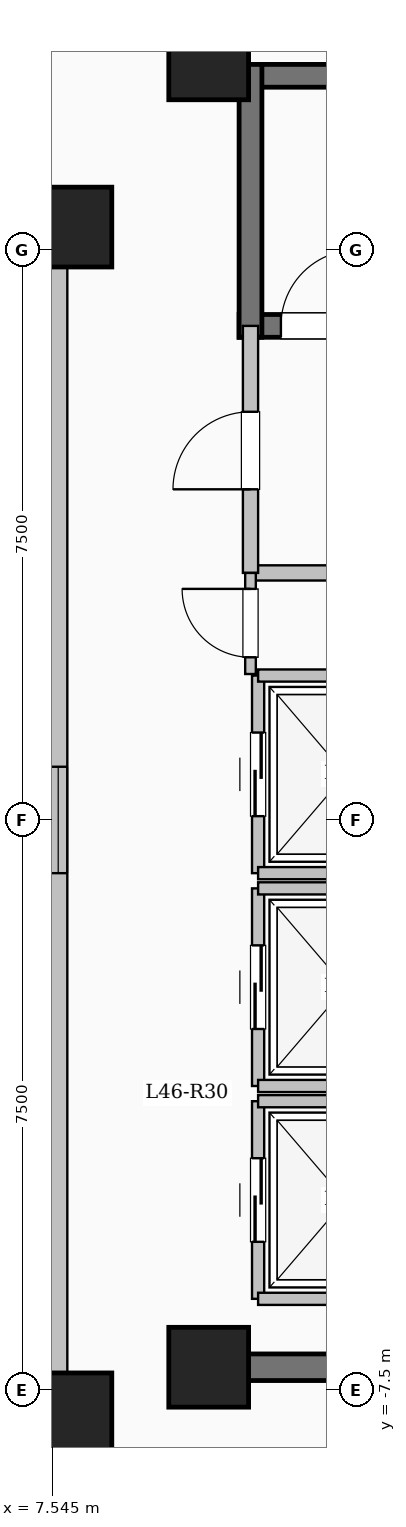
"""IFC4 building model, lengths in metres.
Left out: names, types, materials, properties, quantities, classifications, styles, units other than length and angle.
Written with IfcOpenShell. Run it as: python <this file> out.ifc"""

import sys

from ifc_helpers import new_model, si_unit, direction, frame, frame_2d, origin, origin_2d, place, context, subcontext, project, spatial, rectangle, extrude, element, fill, save


model = new_model("IFC4")
c1 = context("Model", 3, precision=1e-05, world=origin(), true_north=direction((0.0, 1.0)))
c2 = subcontext(c1, "Body", "Model", "MODEL_VIEW")
j1 = project(units=[si_unit("LENGTHUNIT", "METRE"), si_unit("PLANEANGLEUNIT", "RADIAN")], contexts=[c1])
p1 = place(None, origin())
s1 = spatial("IfcSite", under=j1, at=p1, CompositionType="ELEMENT")
p2 = place(p1, origin())
s2 = spatial("IfcBuilding", under=s1, at=p2, CompositionType="ELEMENT")
p3 = place(p2, frame((0.0, 0.0, 169.45)))
s3 = spatial("IfcBuildingStorey", under=s2, at=p3, CompositionType="ELEMENT", Elevation=169.45)
for number, where, z_axis, x_axis in (
    (1, (7.8, -7.8, 0.0), (0.0, 0.0, 1.0), (1.0, 0.0, 0.0)),
    (2, (7.8, 7.8, 0.0), (0.0, 0.0, 1.0), (1.0, 0.0, 0.0)),
    (3, (9.6, -7.2, 0.0), (0.0, 0.0, 1.0), (1.0, 0.0, 0.0)),
    (4, (9.6, 10.0, 0.0), (0.0, 0.0, 1.0), (1.0, 0.0, 0.0)),
):
    element("IfcColumn", number, at=place(p3, frame(where, z_axis=z_axis, x_axis=x_axis)), inside=s3, PredefinedType="COLUMN", context=c2, shape_type="SweptSolid", body=[
        extrude(rectangle(XDim=1.05, YDim=1.05, at=origin_2d()), origin(), (0.0, 0.0, 1.0), 3.35),
    ])
p4 = place(p3, frame((-7.62, -7.62, 0.0), z_axis=(0.0, 0.0, 1.0), x_axis=(1.0, 0.0, 0.0)))
e5 = element("IfcWall", 5, at=p4, inside=s3, PredefinedType="SOLIDWALL", context=c2, shape_type="SweptSolid", body=[
    extrude(rectangle(XDim=15.24, YDim=0.24, at=frame_2d((7.62, 0.0))), origin(), (0.0, 0.0, 1.0), 3.05),
])
p5 = place(p4, frame((6.92, 0.0, 0.95)))
e6 = element("IfcOpeningElement", 6, at=p5, cuts=e5, PredefinedType="OPENING", context=c2, shape_type="SweptSolid", body=[
    extrude(rectangle(XDim=1.4, YDim=1.5, at=frame_2d((0.7, 0.75))), frame((0.0, 0.13, 0.0), z_axis=(0.0, -1.0, 0.0), x_axis=(1.0, 0.0, 0.0)), (0.0, 0.0, 1.0), 0.26),
])
p6 = place(p3, frame((7.62, -7.62, 0.0), z_axis=(0.0, 0.0, 1.0), x_axis=(0.0, 1.0, 0.0)))
e7 = element("IfcWall", 7, at=p6, inside=s3, PredefinedType="SOLIDWALL", context=c2, shape_type="SweptSolid", body=[
    extrude(rectangle(XDim=15.24, YDim=0.24, at=frame_2d((7.62, 0.0))), origin(), (0.0, 0.0, 1.0), 3.05),
])
p7 = place(p6, frame((6.92, 0.0, 0.95)))
e8 = element("IfcOpeningElement", 8, at=p7, cuts=e7, PredefinedType="OPENING", context=c2, shape_type="SweptSolid", body=[
    extrude(rectangle(XDim=1.4, YDim=1.5, at=frame_2d((0.7, 0.75))), frame((0.0, 0.13, 0.0), z_axis=(0.0, -1.0, 0.0), x_axis=(1.0, 0.0, 0.0)), (0.0, 0.0, 1.0), 0.26),
])
p8 = place(p3, frame((7.62, 7.62, 0.0), z_axis=(0.0, 0.0, 1.0), x_axis=(-1.0, 0.0, 0.0)))
e9 = element("IfcWall", 9, at=p8, inside=s3, PredefinedType="SOLIDWALL", context=c2, shape_type="SweptSolid", body=[
    extrude(rectangle(XDim=15.24, YDim=0.24, at=frame_2d((7.62, 0.0))), origin(), (0.0, 0.0, 1.0), 3.05),
])
p9 = place(p8, frame((6.92, 0.0, 0.95)))
e10 = element("IfcOpeningElement", 10, at=p9, cuts=e9, PredefinedType="OPENING", context=c2, shape_type="SweptSolid", body=[
    extrude(rectangle(XDim=1.4, YDim=1.5, at=frame_2d((0.7, 0.75))), frame((0.0, 0.13, 0.0), z_axis=(0.0, -1.0, 0.0), x_axis=(1.0, 0.0, 0.0)), (0.0, 0.0, 1.0), 0.26),
])
p10 = place(p3, frame((10.0, 9.79, 0.0), z_axis=(0.0, 0.0, 1.0), x_axis=(1.0, 0.0, 0.0)))
e11 = element("IfcWall", 11, at=p10, inside=s3, PredefinedType="SHEAR", context=c2, shape_type="SweptSolid", body=[
    extrude(rectangle(XDim=8.0, YDim=0.3, at=frame_2d((4.0, 0.0))), origin(), (0.0, 0.0, 1.0), 3.35),
])
p11 = place(p3, frame((10.0, 6.5, 0.0), z_axis=(0.0, 0.0, 1.0), x_axis=(1.0, 0.0, 0.0)))
e12 = element("IfcWall", 12, at=p11, inside=s3, PredefinedType="SHEAR", context=c2, shape_type="SweptSolid", body=[
    extrude(rectangle(XDim=8.0, YDim=0.3, at=frame_2d((4.0, 0.0))), origin(), (0.0, 0.0, 1.0), 3.35),
])
p12 = place(p11, frame((0.55, 0.0, 0.0)))
e13 = element("IfcOpeningElement", 13, at=p12, cuts=e12, PredefinedType="OPENING", context=c2, shape_type="SweptSolid", body=[
    extrude(rectangle(XDim=1.0, YDim=2.15, at=frame_2d((0.5, 1.075))), frame((0.0, 0.16, 0.0), z_axis=(0.0, -1.0, 0.0), x_axis=(1.0, 0.0, 0.0)), (0.0, 0.0, 1.0), 0.32),
])
p13 = place(p3, frame((10.15, 6.35, 0.0), z_axis=(0.0, 0.0, 1.0), x_axis=(0.0, 1.0, 0.0)))
e14 = element("IfcWall", 14, at=p13, inside=s3, PredefinedType="SHEAR", context=c2, shape_type="SweptSolid", body=[
    extrude(rectangle(XDim=3.59, YDim=0.3, at=frame_2d((1.795, 0.0))), origin(), (0.0, 0.0, 1.0), 3.35),
])
p14 = place(p3, frame((10.15, 3.25, 0.0), z_axis=(0.0, 0.0, 1.0), x_axis=(1.0, 0.0, 0.0)))
e15 = element("IfcWall", 15, at=p14, inside=s3, PredefinedType="SOLIDWALL", context=c2, shape_type="SweptSolid", body=[
    extrude(rectangle(XDim=5.4, YDim=0.2, at=frame_2d((2.7, 0.0))), origin(), (0.0, 0.0, 1.0), 3.05),
])
p15 = place(p3, frame((10.15, 3.25, 0.0), z_axis=(0.0, 0.0, 1.0), x_axis=(0.0, 1.0, 0.0)))
e16 = element("IfcWall", 16, at=p15, inside=s3, PredefinedType="SOLIDWALL", context=c2, shape_type="SweptSolid", body=[
    extrude(rectangle(XDim=3.25, YDim=0.2, at=frame_2d((1.625, 0.0))), origin(), (0.0, 0.0, 1.0), 3.05),
])
p16 = place(p15, frame((1.1, 0.0, 0.0)))
e17 = element("IfcOpeningElement", 17, at=p16, cuts=e16, PredefinedType="OPENING", context=c2, shape_type="SweptSolid", body=[
    extrude(rectangle(XDim=1.02, YDim=2.15, at=frame_2d((0.51, 1.075))), frame((0.0, 0.11, 0.0), z_axis=(0.0, -1.0, 0.0), x_axis=(1.0, 0.0, 0.0)), (0.0, 0.0, 1.0), 0.22),
])
p17 = place(p3, frame((10.25, -6.3, 0.0), z_axis=(0.0, 0.0, 1.0), x_axis=(0.0, 1.0, 0.0)))
e18 = element("IfcWall", 18, at=p17, inside=s3, PredefinedType="SOLIDWALL", context=c2, shape_type="SweptSolid", body=[
    extrude(rectangle(XDim=2.6, YDim=0.16, at=frame_2d((1.3, 0.0))), origin(), (0.0, 0.0, 1.0), 3.05),
])
p18 = place(p17, frame((0.75, 0.0, 0.0)))
e19 = element("IfcOpeningElement", 19, at=p18, cuts=e18, PredefinedType="OPENING", context=c2, shape_type="SweptSolid", body=[
    extrude(rectangle(XDim=1.1, YDim=2.15, at=frame_2d((0.55, 1.075))), frame((0.0, 0.09, 0.0), z_axis=(0.0, -1.0, 0.0), x_axis=(1.0, 0.0, 0.0)), (0.0, 0.0, 1.0), 0.18),
])
for number, where, z_axis, x_axis in (
    (20, (10.25, -6.3, 0.0), (0.0, 0.0, 1.0), (1.0, 0.0, 0.0)),
    (21, (10.25, -3.7, 0.0), (0.0, 0.0, 1.0), (1.0, 0.0, 0.0)),
):
    element("IfcWall", number, at=place(p3, frame(where, z_axis=z_axis, x_axis=x_axis)), inside=s3, PredefinedType="SOLIDWALL", context=c2, shape_type="SweptSolid", body=[
        extrude(rectangle(XDim=2.3, YDim=0.16, at=frame_2d((1.15, 0.0))), origin(), (0.0, 0.0, 1.0), 3.05),
    ])
p19 = place(p3, frame((10.25, -3.5, 0.0), z_axis=(0.0, 0.0, 1.0), x_axis=(0.0, 1.0, 0.0)))
e22 = element("IfcWall", 22, at=p19, inside=s3, PredefinedType="SOLIDWALL", context=c2, shape_type="SweptSolid", body=[
    extrude(rectangle(XDim=2.6, YDim=0.16, at=frame_2d((1.3, 0.0))), origin(), (0.0, 0.0, 1.0), 3.05),
])
p20 = place(p19, frame((0.75, 0.0, 0.0)))
e23 = element("IfcOpeningElement", 23, at=p20, cuts=e22, PredefinedType="OPENING", context=c2, shape_type="SweptSolid", body=[
    extrude(rectangle(XDim=1.1, YDim=2.15, at=frame_2d((0.55, 1.075))), frame((0.0, 0.09, 0.0), z_axis=(0.0, -1.0, 0.0), x_axis=(1.0, 0.0, 0.0)), (0.0, 0.0, 1.0), 0.18),
])
for number, where, z_axis, x_axis in (
    (24, (10.25, -3.5, 0.0), (0.0, 0.0, 1.0), (1.0, 0.0, 0.0)),
    (25, (10.25, -0.9, 0.0), (0.0, 0.0, 1.0), (1.0, 0.0, 0.0)),
):
    element("IfcWall", number, at=place(p3, frame(where, z_axis=z_axis, x_axis=x_axis)), inside=s3, PredefinedType="SOLIDWALL", context=c2, shape_type="SweptSolid", body=[
        extrude(rectangle(XDim=2.3, YDim=0.16, at=frame_2d((1.15, 0.0))), origin(), (0.0, 0.0, 1.0), 3.05),
    ])
p21 = place(p3, frame((10.25, -0.7, 0.0), z_axis=(0.0, 0.0, 1.0), x_axis=(0.0, 1.0, 0.0)))
e26 = element("IfcWall", 26, at=p21, inside=s3, PredefinedType="SOLIDWALL", context=c2, shape_type="SweptSolid", body=[
    extrude(rectangle(XDim=2.6, YDim=0.16, at=frame_2d((1.3, 0.0))), origin(), (0.0, 0.0, 1.0), 3.05),
])
p22 = place(p21, frame((0.75, 0.0, 0.0)))
e27 = element("IfcOpeningElement", 27, at=p22, cuts=e26, PredefinedType="OPENING", context=c2, shape_type="SweptSolid", body=[
    extrude(rectangle(XDim=1.1, YDim=2.15, at=frame_2d((0.55, 1.075))), frame((0.0, 0.09, 0.0), z_axis=(0.0, -1.0, 0.0), x_axis=(1.0, 0.0, 0.0)), (0.0, 0.0, 1.0), 0.18),
])
for number, where, z_axis, x_axis in (
    (28, (10.25, -0.7, 0.0), (0.0, 0.0, 1.0), (1.0, 0.0, 0.0)),
    (29, (10.25, 1.9, 0.0), (0.0, 0.0, 1.0), (1.0, 0.0, 0.0)),
):
    element("IfcWall", number, at=place(p3, frame(where, z_axis=z_axis, x_axis=x_axis)), inside=s3, PredefinedType="SOLIDWALL", context=c2, shape_type="SweptSolid", body=[
        extrude(rectangle(XDim=2.3, YDim=0.16, at=frame_2d((1.15, 0.0))), origin(), (0.0, 0.0, 1.0), 3.05),
    ])
p23 = place(p3, frame((10.075, -7.2, 0.0), z_axis=(0.0, 0.0, 1.0), x_axis=(1.0, 0.0, 0.0)))
e30 = element("IfcWall", 30, at=p23, inside=s3, PredefinedType="SHEAR", context=c2, shape_type="SweptSolid", body=[
    extrude(rectangle(XDim=8.55, YDim=0.35, at=frame_2d((4.275, 0.0))), origin(), (0.0, 0.0, 1.0), 3.35),
])
p24 = place(p3, frame((10.15, 1.92, 0.0), z_axis=(0.0, 0.0, 1.0), x_axis=(0.0, 1.0, 0.0)))
e31 = element("IfcWall", 31, at=p24, inside=s3, PredefinedType="PARTITIONING", context=c2, shape_type="SweptSolid", body=[
    extrude(rectangle(XDim=1.33, YDim=0.14, at=frame_2d((0.665, 0.0))), origin(), (0.0, 0.0, 1.0), 3.05),
])
p25 = place(p24, frame((0.22, 0.0, 0.0)))
e32 = element("IfcOpeningElement", 32, at=p25, cuts=e31, PredefinedType="OPENING", context=c2, shape_type="SweptSolid", body=[
    extrude(rectangle(XDim=0.9, YDim=2.08, at=frame_2d((0.45, 1.04))), frame((0.0, 0.08, 0.0), z_axis=(0.0, -1.0, 0.0), x_axis=(1.0, 0.0, 0.0)), (0.0, 0.0, 1.0), 0.16),
])
p26 = place(p7, origin())
e33 = element("IfcWindow", 33, at=p26, inside=s3, PartitioningType="SINGLE_PANEL", PredefinedType="WINDOW", context=c2, shape_type="SweptSolid", body=[
    extrude(rectangle(XDim=1.4, YDim=1.5, at=frame_2d((0.7, 0.75))), frame((0.0, 0.03, 0.0), z_axis=(0.0, -1.0, 0.0), x_axis=(1.0, 0.0, 0.0)), (0.0, 0.0, 1.0), 0.06),
])
fill(e8, e33)
p27 = place(p12, origin())
e34 = element("IfcDoor", 34, at=p27, inside=s3, OperationType="SINGLE_SWING_RIGHT", PredefinedType="DOOR", context=c2, shape_type="SweptSolid", body=[
    extrude(rectangle(XDim=1.0, YDim=2.15, at=frame_2d((0.5, 1.075))), frame((0.0, 0.025, 0.0), z_axis=(0.0, -1.0, 0.0), x_axis=(1.0, 0.0, 0.0)), (0.0, 0.0, 1.0), 0.05),
])
fill(e13, e34)
p28 = place(p16, origin())
e35 = element("IfcDoor", 35, at=p28, inside=s3, OperationType="SINGLE_SWING_LEFT", PredefinedType="DOOR", context=c2, shape_type="SweptSolid", body=[
    extrude(rectangle(XDim=1.02, YDim=2.15, at=frame_2d((0.51, 1.075))), frame((0.0, 0.025, 0.0), z_axis=(0.0, -1.0, 0.0), x_axis=(1.0, 0.0, 0.0)), (0.0, 0.0, 1.0), 0.05),
])
fill(e17, e35)
p29 = place(p18, origin())
e36 = element("IfcDoor", 36, at=p29, inside=s3, OperationType="SLIDING_TO_LEFT", PredefinedType="DOOR", context=c2, shape_type="SweptSolid", body=[
    extrude(rectangle(XDim=1.1, YDim=2.15, at=frame_2d((0.55, 1.075))), frame((0.0, 0.025, 0.0), z_axis=(0.0, -1.0, 0.0), x_axis=(1.0, 0.0, 0.0)), (0.0, 0.0, 1.0), 0.05),
])
fill(e19, e36)
p30 = place(p20, origin())
e37 = element("IfcDoor", 37, at=p30, inside=s3, OperationType="SLIDING_TO_LEFT", PredefinedType="DOOR", context=c2, shape_type="SweptSolid", body=[
    extrude(rectangle(XDim=1.1, YDim=2.15, at=frame_2d((0.55, 1.075))), frame((0.0, 0.025, 0.0), z_axis=(0.0, -1.0, 0.0), x_axis=(1.0, 0.0, 0.0)), (0.0, 0.0, 1.0), 0.05),
])
fill(e23, e37)
p31 = place(p22, origin())
e38 = element("IfcDoor", 38, at=p31, inside=s3, OperationType="SLIDING_TO_LEFT", PredefinedType="DOOR", context=c2, shape_type="SweptSolid", body=[
    extrude(rectangle(XDim=1.1, YDim=2.15, at=frame_2d((0.55, 1.075))), frame((0.0, 0.025, 0.0), z_axis=(0.0, -1.0, 0.0), x_axis=(1.0, 0.0, 0.0)), (0.0, 0.0, 1.0), 0.05),
])
fill(e27, e38)
p32 = place(p25, origin())
e39 = element("IfcDoor", 39, at=p32, inside=s3, OperationType="SINGLE_SWING_RIGHT", PredefinedType="DOOR", context=c2, shape_type="SweptSolid", body=[
    extrude(rectangle(XDim=0.9, YDim=2.08, at=frame_2d((0.45, 1.04))), frame((0.0, 0.025, 0.0), z_axis=(0.0, -1.0, 0.0), x_axis=(1.0, 0.0, 0.0)), (0.0, 0.0, 1.0), 0.05),
])
fill(e32, e39)
save(model, sys.argv[1])
